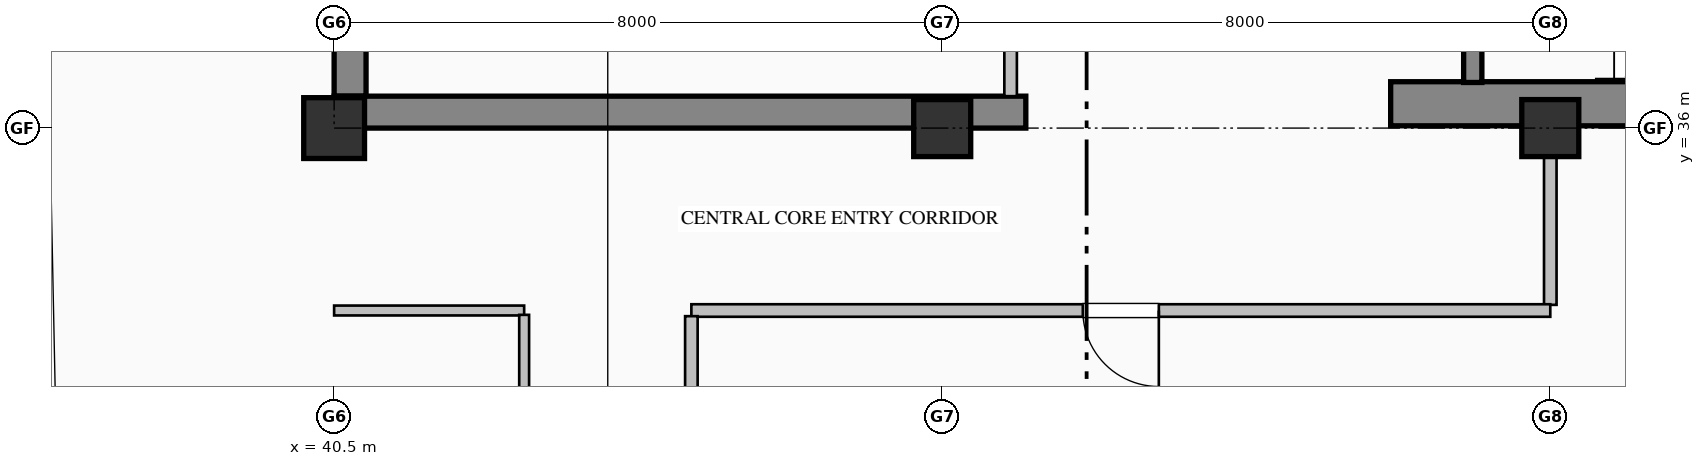
"""IFC4 building model, lengths in metres.
Left out: names, types, materials, properties, quantities, classifications, styles, units other than length and angle.
Written with IfcOpenShell. Run it as: python <this file> out.ifc"""

import sys

from ifc_helpers import new_model, si_unit, direction, frame, frame_2d, origin, origin_2d, place, context, subcontext, project, spatial, rectangle, hollow_rectangle, extrude, element, fill, save


model = new_model("IFC4")
c1 = context("Model", 3, precision=1e-05, world=origin(), true_north=direction((0.0, 1.0)))
c2 = subcontext(c1, "Body", "Model", "MODEL_VIEW")
j1 = project(units=[si_unit("LENGTHUNIT", "METRE"), si_unit("PLANEANGLEUNIT", "RADIAN")], contexts=[c1])
p1 = place(None, origin())
s1 = spatial("IfcSite", under=j1, at=p1, CompositionType="ELEMENT")
p2 = place(p1, origin())
s2 = spatial("IfcBuilding", under=s1, at=p2, CompositionType="ELEMENT")
p3 = place(p2, frame((0.0, 0.0, 287.2)))
s3 = spatial("IfcBuildingStorey", under=s2, at=p3, CompositionType="ELEMENT", Elevation=287.2)
p4 = place(p3, frame((40.71, 36.42, 0.0), z_axis=(0.0, 0.0, 1.0), x_axis=(0.0, 1.0, 0.0)))
e1 = element("IfcWall", 1, at=p4, inside=s3, PredefinedType="SHEAR", context=c2, shape_type="SweptSolid", body=[
    extrude(rectangle(XDim=7.98, YDim=0.42, at=frame_2d((3.99, 0.0))), origin(), (0.0, 0.0, 1.0), 3.785),
])
p5 = place(p3, frame((40.5, 36.21, 0.0), z_axis=(0.0, 0.0, 1.0), x_axis=(1.0, 0.0, 0.0)))
e2 = element("IfcWall", 2, at=p5, inside=s3, PredefinedType="SHEAR", context=c2, shape_type="SweptSolid", body=[
    extrude(rectangle(XDim=9.1, YDim=0.42, at=frame_2d((4.55, 0.0))), origin(), (0.0, 0.0, 1.0), 3.785),
])
p6 = place(p3, frame((54.4, 36.32, 0.0), z_axis=(0.0, 0.0, 1.0), x_axis=(1.0, 0.0, 0.0)))
e3 = element("IfcWall", 3, at=p6, inside=s3, PredefinedType="SHEAR", context=c2, shape_type="SweptSolid", body=[
    extrude(rectangle(XDim=9.6, YDim=0.58, at=frame_2d((4.8, 0.0))), origin(), (0.0, 0.0, 1.0), 4.0),
])
p7 = place(p3, frame((40.5, 36.0, 0.0), z_axis=(0.0, 0.0, 1.0), x_axis=(1.0, 0.0, 0.0)))
e4 = element("IfcColumn", 4, at=p7, inside=s3, PredefinedType="COLUMN", context=c2, shape_type="SweptSolid", body=[
    extrude(hollow_rectangle(XDim=0.8, YDim=0.8, WallThickness=0.032, at=origin_2d()), origin(), (0.0, 0.0, 1.0), 4.0),
])
for number, where, z_axis, x_axis in (
    (5, (48.5, 36.0, 0.0), (0.0, 0.0, 1.0), (1.0, 0.0, 0.0)),
    (6, (56.5, 36.0, 0.0), (0.0, 0.0, 1.0), (1.0, 0.0, 0.0)),
):
    element("IfcColumn", number, at=place(p3, frame(where, z_axis=z_axis, x_axis=x_axis)), inside=s3, PredefinedType="COLUMN", context=c2, shape_type="SweptSolid", body=[
        extrude(rectangle(XDim=0.75, YDim=0.75, at=origin_2d()), origin(), (0.0, 0.0, 1.0), 4.0),
    ])
p8 = place(p3, frame((55.48, 39.75, 0.0), z_axis=(0.0, 0.0, 1.0), x_axis=(0.0, -1.0, 0.0)))
e7 = element("IfcWall", 7, at=p8, inside=s3, PredefinedType="SOLIDWALL", context=c2, shape_type="SweptSolid", body=[
    extrude(rectangle(XDim=3.15, YDim=0.24, at=frame_2d((1.575, 0.0))), origin(), (0.0, 0.0, 1.0), 4.0),
])
p9 = place(p8, frame((1.0, 0.0, 0.0)))
e8 = element("IfcOpeningElement", 8, at=p9, cuts=e7, PredefinedType="OPENING", context=c2, shape_type="SweptSolid", body=[
    extrude(rectangle(XDim=1.15, YDim=2.2, at=frame_2d((0.575, 1.1))), frame((0.0, 0.13, 0.0), z_axis=(0.0, -1.0, 0.0), x_axis=(1.0, 0.0, 0.0)), (0.0, 0.0, 1.0), 0.26),
])
p10 = place(p3, frame((49.4, 36.42, 0.0), z_axis=(0.0, 0.0, 1.0), x_axis=(0.0, 1.0, 0.0)))
e9 = element("IfcWall", 9, at=p10, inside=s3, PredefinedType="PARTITIONING", context=c2, shape_type="SweptSolid", body=[
    extrude(rectangle(XDim=3.893, YDim=0.165, at=frame_2d((1.947, 0.0))), origin(), (0.0, 0.0, 1.0), 3.027),
])
p11 = place(p10, frame((1.497, 0.0, 0.0)))
e10 = element("IfcOpeningElement", 10, at=p11, cuts=e9, PredefinedType="OPENING", context=c2, shape_type="SweptSolid", body=[
    extrude(rectangle(XDim=0.9, YDim=2.15, at=frame_2d((0.45, 1.075))), frame((0.0, 0.093, 0.0), z_axis=(0.0, -1.0, 0.0), x_axis=(1.0, 0.0, 0.0)), (0.0, 0.0, 1.0), 0.185),
])
p12 = place(p3, frame((56.5, 36.0, 0.0), z_axis=(0.0, 0.0, 1.0), x_axis=(0.0, -1.0, 0.0)))
e11 = element("IfcWall", 11, at=p12, inside=s3, PredefinedType="PARTITIONING", context=c2, shape_type="SweptSolid", body=[
    extrude(rectangle(XDim=2.325, YDim=0.165, at=frame_2d((1.163, 0.0))), origin(), (0.0, 0.0, 1.0), 3.177),
])
p13 = place(p3, frame((56.5, 33.6, 0.0), z_axis=(0.0, 0.0, 1.0), x_axis=(-1.0, 0.0, 0.0)))
e12 = element("IfcWall", 12, at=p13, inside=s3, PredefinedType="PARTITIONING", context=c2, shape_type="SweptSolid", body=[
    extrude(rectangle(XDim=11.3, YDim=0.165, at=frame_2d((5.65, 0.0))), origin(), (0.0, 0.0, 1.0), 3.785),
])
p14 = place(p13, frame((5.15, 0.0, 0.0)))
e13 = element("IfcOpeningElement", 13, at=p14, cuts=e12, PredefinedType="OPENING", context=c2, shape_type="SweptSolid", body=[
    extrude(rectangle(XDim=1.0, YDim=2.15, at=frame_2d((0.5, 1.075))), frame((0.0, 0.093, 0.0), z_axis=(0.0, -1.0, 0.0), x_axis=(1.0, 0.0, 0.0)), (0.0, 0.0, 1.0), 0.185),
])
p15 = place(p3, frame((43.0, 33.6, 0.0), z_axis=(0.0, 0.0, 1.0), x_axis=(-1.0, 0.0, 0.0)))
e14 = element("IfcWall", 14, at=p15, inside=s3, PredefinedType="PARTITIONING", context=c2, shape_type="SweptSolid", body=[
    extrude(rectangle(XDim=2.5, YDim=0.13, at=frame_2d((1.25, 0.0))), origin(), (0.0, 0.0, 1.0), 3.785),
])
p16 = place(p3, frame((45.2, 33.525, 0.0), z_axis=(0.0, 0.0, 1.0), x_axis=(0.0, -1.0, 0.0)))
e15 = element("IfcWall", 15, at=p16, inside=s3, PredefinedType="PARTITIONING", context=c2, shape_type="SweptSolid", body=[
    extrude(rectangle(XDim=5.478, YDim=0.165, at=frame_2d((2.739, 0.0))), origin(), (0.0, 0.0, 1.0), 3.785),
])
p17 = place(p3, frame((43.0, 22.875, 0.0), z_axis=(0.0, 0.0, 1.0), x_axis=(0.0, 1.0, 0.0)))
e16 = element("IfcWall", 16, at=p17, inside=s3, PredefinedType="PARTITIONING", context=c2, shape_type="SweptSolid", body=[
    extrude(rectangle(XDim=10.668, YDim=0.13, at=frame_2d((5.334, 0.0))), origin(), (0.0, 0.0, 1.0), 3.785),
])
p18 = place(p17, frame((4.834, 0.0, 0.0)))
e17 = element("IfcOpeningElement", 17, at=p18, cuts=e16, PredefinedType="OPENING", context=c2, shape_type="SweptSolid", body=[
    extrude(rectangle(XDim=1.0, YDim=2.15, at=frame_2d((0.5, 1.075))), frame((0.0, 0.075, 0.0), z_axis=(0.0, -1.0, 0.0), x_axis=(1.0, 0.0, 0.0)), (0.0, 0.0, 1.0), 0.15),
])
p19 = place(p14, origin())
e18 = element("IfcDoor", 18, at=p19, inside=s3, OperationType="SINGLE_SWING_LEFT", PredefinedType="DOOR", context=c2, shape_type="SweptSolid", body=[
    extrude(rectangle(XDim=1.0, YDim=2.15, at=frame_2d((0.5, 1.075))), frame((0.0, 0.025, 0.0), z_axis=(0.0, -1.0, 0.0), x_axis=(1.0, 0.0, 0.0)), (0.0, 0.0, 1.0), 0.05),
])
fill(e13, e18)
save(model, sys.argv[1])
